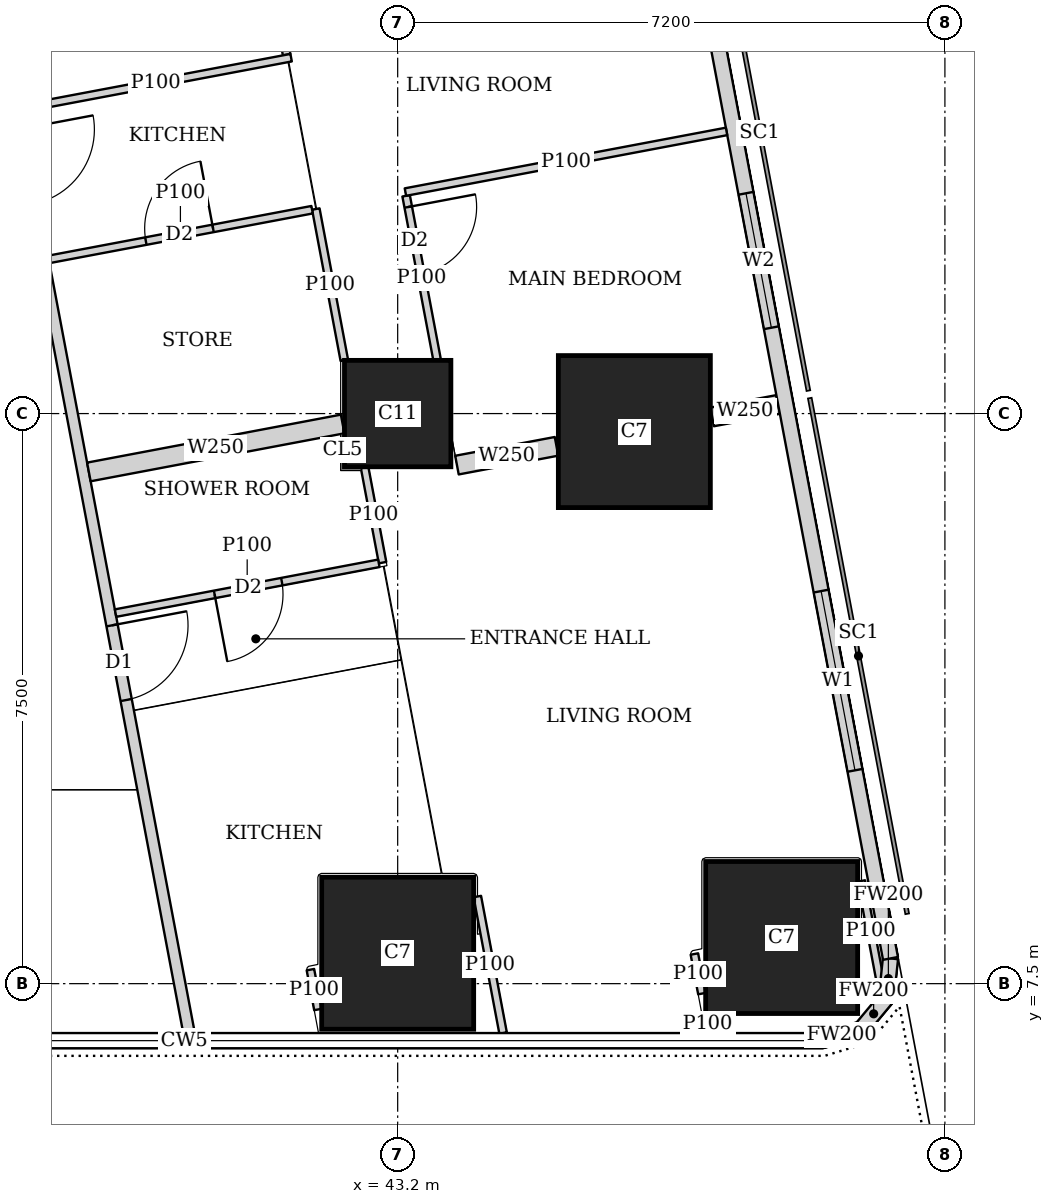
"""IFC4 building model, lengths in metres.
Left out: names, types, materials, properties, quantities, classifications, styles, units other than length and angle.
Written with IfcOpenShell. Run it as: python <this file> out.ifc"""

import sys

from ifc_helpers import new_model, si_unit, direction, frame, frame_2d, origin, origin_2d, place, context, subcontext, project, spatial, rectangle, extrude, element, fill, save


model = new_model("IFC4")
c1 = context("Model", 3, precision=1e-05, world=origin(), true_north=direction((0.0, 1.0)))
c2 = subcontext(c1, "Body", "Model", "MODEL_VIEW")
j1 = project(units=[si_unit("LENGTHUNIT", "METRE"), si_unit("PLANEANGLEUNIT", "RADIAN")], contexts=[c1])
p1 = place(None, origin())
s1 = spatial("IfcSite", under=j1, at=p1, CompositionType="ELEMENT")
p2 = place(p1, origin())
s2 = spatial("IfcBuilding", under=s1, at=p2, CompositionType="ELEMENT")
p3 = place(p2, frame((0.0, 0.0, 251.6)))
s3 = spatial("IfcBuildingStorey", under=s2, at=p3, CompositionType="ELEMENT", Elevation=251.6)
for number, where, z_axis, x_axis in (
    (1, (43.2, 7.9, 0.0), (0.0, 0.0, 1.0), (1.0, 0.0, 0.0)),
    (2, (48.252, 8.107, 0.0), (0.0, 0.0, 1.0), (1.0, 0.0, 0.0)),
):
    element("IfcColumn", number, at=place(p3, frame(where, z_axis=z_axis, x_axis=x_axis)), inside=s3, PredefinedType="COLUMN", context=c2, shape_type="SweptSolid", body=[
        extrude(rectangle(XDim=2.0, YDim=2.0, at=origin_2d()), origin(), (0.0, 0.0, 1.0), 3.75),
    ])
p4 = place(p3, frame((43.2, 15.0, 0.0), z_axis=(0.0, 0.0, 1.0), x_axis=(1.0, 0.0, 0.0)))
e3 = element("IfcColumn", 3, at=p4, inside=s3, PredefinedType="COLUMN", context=c2, shape_type="SweptSolid", body=[
    extrude(rectangle(XDim=1.4, YDim=1.4, at=origin_2d()), origin(), (0.0, 0.0, 1.0), 3.75),
])
p5 = place(p3, frame((46.314, 14.763, 0.0), z_axis=(0.0, 0.0, 1.0), x_axis=(1.0, 0.0, 0.0)))
e4 = element("IfcColumn", 4, at=p5, inside=s3, PredefinedType="COLUMN", context=c2, shape_type="SweptSolid", body=[
    extrude(rectangle(XDim=2.0, YDim=2.0, at=origin_2d()), origin(), (0.0, 0.0, 1.0), 3.75),
])
p6 = place(p3, frame((48.787, 6.75, 0.0), z_axis=(0.0, 0.0, 1.0), x_axis=(0.957282247819, 0.289155145225, 0.0)))
e5 = element("IfcWall", 5, at=p6, inside=s3, PredefinedType="SOLIDWALL", context=c2, shape_type="SweptSolid", body=[
    extrude(rectangle(XDim=0.533, YDim=0.2, at=frame_2d((0.266, 0.0))), origin(), (0.0, 0.0, 1.0), 3.5),
])
p7 = place(p3, frame((49.297, 6.904, 0.0), z_axis=(0.0, 0.0, 1.0), x_axis=(0.639255849474, 0.768994121508, 0.0)))
e6 = element("IfcWall", 6, at=p7, inside=s3, PredefinedType="SOLIDWALL", context=c2, shape_type="SweptSolid", body=[
    extrude(rectangle(XDim=0.518, YDim=0.2, at=frame_2d((0.259, 0.0))), origin(), (0.0, 0.0, 1.0), 3.5),
])
p8 = place(p3, frame((49.628, 7.302, 0.0), z_axis=(0.0, 0.0, 1.0), x_axis=(0.105352390132, 0.994434952068, 0.0)))
e7 = element("IfcWall", 7, at=p8, inside=s3, PredefinedType="SOLIDWALL", context=c2, shape_type="SweptSolid", body=[
    extrude(rectangle(XDim=0.533, YDim=0.2, at=frame_2d((0.267, 0.0))), origin(), (0.0, 0.0, 1.0), 3.5),
])
p9 = place(p3, frame((49.684, 7.832, 0.0), z_axis=(0.0, 0.0, 1.0), x_axis=(-0.185616669694, 0.982622232565, 0.0)))
e8 = element("IfcWall", 8, at=p9, inside=s3, PredefinedType="SOLIDWALL", context=c2, shape_type="SweptSolid", body=[
    extrude(rectangle(XDim=36.0, YDim=0.2, at=frame_2d((18.0, 0.0))), origin(), (0.0, 0.0, 1.0), 3.5),
])
p10 = place(p9, frame((2.518, 0.0, 0.9)))
e9 = element("IfcOpeningElement", 9, at=p10, cuts=e8, PredefinedType="OPENING", context=c2, shape_type="SweptSolid", body=[
    extrude(rectangle(XDim=2.4, YDim=1.5, at=frame_2d((1.2, 0.75))), frame((0.0, 0.11, 0.0), z_axis=(0.0, -1.0, 0.0), x_axis=(1.0, 0.0, 0.0)), (0.0, 0.0, 1.0), 0.22),
])
p11 = place(p9, frame((8.444, 0.0, 0.9)))
e10 = element("IfcOpeningElement", 10, at=p11, cuts=e8, PredefinedType="OPENING", context=c2, shape_type="SweptSolid", body=[
    extrude(rectangle(XDim=1.8, YDim=1.5, at=frame_2d((0.9, 0.75))), frame((0.0, 0.11, 0.0), z_axis=(0.0, -1.0, 0.0), x_axis=(1.0, 0.0, 0.0)), (0.0, 0.0, 1.0), 0.22),
])
p12 = place(p9, frame((12.261, 0.0, 0.9)))
e11 = element("IfcOpeningElement", 11, at=p12, cuts=e8, PredefinedType="OPENING", context=c2, shape_type="SweptSolid", body=[
    extrude(rectangle(XDim=1.8, YDim=1.5, at=frame_2d((0.9, 0.75))), frame((0.0, 0.11, 0.0), z_axis=(0.0, -1.0, 0.0), x_axis=(1.0, 0.0, 0.0)), (0.0, 0.0, 1.0), 0.22),
])
p13 = place(p9, frame((16.078, 0.0, 0.9)))
e12 = element("IfcOpeningElement", 12, at=p13, cuts=e8, PredefinedType="OPENING", context=c2, shape_type="SweptSolid", body=[
    extrude(rectangle(XDim=1.8, YDim=1.5, at=frame_2d((0.9, 0.75))), frame((0.0, 0.11, 0.0), z_axis=(0.0, -1.0, 0.0), x_axis=(1.0, 0.0, 0.0)), (0.0, 0.0, 1.0), 0.22),
])
p14 = place(p9, frame((19.894, 0.0, 0.9)))
e13 = element("IfcOpeningElement", 13, at=p14, cuts=e8, PredefinedType="OPENING", context=c2, shape_type="SweptSolid", body=[
    extrude(rectangle(XDim=1.8, YDim=1.5, at=frame_2d((0.9, 0.75))), frame((0.0, 0.11, 0.0), z_axis=(0.0, -1.0, 0.0), x_axis=(1.0, 0.0, 0.0)), (0.0, 0.0, 1.0), 0.22),
])
p15 = place(p9, frame((23.71, 0.0, 0.9)))
e14 = element("IfcOpeningElement", 14, at=p15, cuts=e8, PredefinedType="OPENING", context=c2, shape_type="SweptSolid", body=[
    extrude(rectangle(XDim=1.8, YDim=1.5, at=frame_2d((0.9, 0.75))), frame((0.0, 0.11, 0.0), z_axis=(0.0, -1.0, 0.0), x_axis=(1.0, 0.0, 0.0)), (0.0, 0.0, 1.0), 0.22),
])
p16 = place(p9, frame((27.526, 0.0, 0.9)))
e15 = element("IfcOpeningElement", 15, at=p16, cuts=e8, PredefinedType="OPENING", context=c2, shape_type="SweptSolid", body=[
    extrude(rectangle(XDim=1.8, YDim=1.5, at=frame_2d((0.9, 0.75))), frame((0.0, 0.11, 0.0), z_axis=(0.0, -1.0, 0.0), x_axis=(1.0, 0.0, 0.0)), (0.0, 0.0, 1.0), 0.22),
])
p17 = place(p9, frame((32.046, 0.0, 0.9)))
e16 = element("IfcOpeningElement", 16, at=p17, cuts=e8, PredefinedType="OPENING", context=c2, shape_type="SweptSolid", body=[
    extrude(rectangle(XDim=1.8, YDim=1.5, at=frame_2d((0.9, 0.75))), frame((0.0, 0.11, 0.0), z_axis=(0.0, -1.0, 0.0), x_axis=(1.0, 0.0, 0.0)), (0.0, 0.0, 1.0), 0.22),
])
p18 = place(p3, frame((33.781, 42.186, 0.0), z_axis=(0.0, 0.0, 1.0), x_axis=(0.185593518645, -0.9826266055, 0.0)))
e17 = element("IfcWall", 17, at=p18, inside=s3, PredefinedType="SOLIDWALL", context=c2, shape_type="SweptSolid", body=[
    extrude(rectangle(XDim=35.961, YDim=0.15, at=frame_2d((17.98, 0.0))), origin(), (0.0, 0.0, 1.0), 2.5),
])
p19 = place(p18, frame((7.183, 0.0, 0.0)))
e18 = element("IfcOpeningElement", 18, at=p19, cuts=e17, PredefinedType="OPENING", context=c2, shape_type="SweptSolid", body=[
    extrude(rectangle(XDim=1.0, YDim=2.1, at=frame_2d((0.5, 1.05))), frame((0.0, 0.085, 0.0), z_axis=(0.0, -1.0, 0.0), x_axis=(1.0, 0.0, 0.0)), (0.0, 0.0, 1.0), 0.17),
])
p20 = place(p18, frame((11.76, 0.0, 0.0)))
e19 = element("IfcOpeningElement", 19, at=p20, cuts=e17, PredefinedType="OPENING", context=c2, shape_type="SweptSolid", body=[
    extrude(rectangle(XDim=1.0, YDim=2.1, at=frame_2d((0.5, 1.05))), frame((0.0, 0.085, 0.0), z_axis=(0.0, -1.0, 0.0), x_axis=(1.0, 0.0, 0.0)), (0.0, 0.0, 1.0), 0.17),
])
p21 = place(p18, frame((23.863, 0.0, 0.0)))
e20 = element("IfcOpeningElement", 20, at=p21, cuts=e17, PredefinedType="OPENING", context=c2, shape_type="SweptSolid", body=[
    extrude(rectangle(XDim=1.0, YDim=2.1, at=frame_2d((0.5, 1.05))), frame((0.0, 0.085, 0.0), z_axis=(0.0, -1.0, 0.0), x_axis=(1.0, 0.0, 0.0)), (0.0, 0.0, 1.0), 0.17),
])
p22 = place(p18, frame((30.502, 0.0, 0.0)))
e21 = element("IfcOpeningElement", 21, at=p22, cuts=e17, PredefinedType="OPENING", context=c2, shape_type="SweptSolid", body=[
    extrude(rectangle(XDim=1.0, YDim=2.1, at=frame_2d((0.5, 1.05))), frame((0.0, 0.085, 0.0), z_axis=(0.0, -1.0, 0.0), x_axis=(1.0, 0.0, 0.0)), (0.0, 0.0, 1.0), 0.17),
])
p23 = place(p3, frame((44.248, 8.646, 0.0), z_axis=(0.0, 0.0, 1.0), x_axis=(0.185417594585, -0.982659816833, 0.0)))
e22 = element("IfcWall", 22, at=p23, inside=s3, PredefinedType="PARTITIONING", context=c2, shape_type="SweptSolid", body=[
    extrude(rectangle(XDim=1.828, YDim=0.1, at=frame_2d((0.914, 0.0))), origin(), (0.0, 0.0, 1.0), 2.05),
])
p24 = place(p3, frame((42.151, 7.16, 0.0), z_axis=(0.0, 0.0, 1.0), x_axis=(-0.185366164644, 0.982669519729, 0.0)))
e23 = element("IfcWall", 23, at=p24, inside=s3, PredefinedType="PARTITIONING", context=c2, shape_type="SweptSolid", body=[
    extrude(rectangle(XDim=0.533, YDim=0.1, at=frame_2d((0.267, 0.0))), origin(), (0.0, 0.0, 1.0), 2.5),
])
p25 = place(p3, frame((49.3, 8.851, 0.0), z_axis=(0.0, 0.0, 1.0), x_axis=(0.18581620423, -0.982584519645, 0.0)))
e24 = element("IfcWall", 24, at=p25, inside=s3, PredefinedType="PARTITIONING", context=c2, shape_type="SweptSolid", body=[
    extrude(rectangle(XDim=1.351, YDim=0.1, at=frame_2d((0.675, 0.0))), origin(), (0.0, 0.0, 1.0), 3.5),
])
p26 = place(p3, frame((47.301, 6.85, 0.0), z_axis=(0.0, 0.0, 1.0), x_axis=(-0.187513903188, 0.982261948826, 0.0)))
e25 = element("IfcWall", 25, at=p26, inside=s3, PredefinedType="PARTITIONING", context=c2, shape_type="SweptSolid", body=[
    extrude(rectangle(XDim=0.251, YDim=0.1, at=frame_2d((0.125, 0.0))), origin(), (0.0, 0.0, 1.0), 3.5),
])
p27 = place(p3, frame((47.203, 7.369, 0.0), z_axis=(0.0, 0.0, 1.0), x_axis=(-0.186456243114, 0.982463266185, 0.0)))
e26 = element("IfcWall", 26, at=p27, inside=s3, PredefinedType="PARTITIONING", context=c2, shape_type="SweptSolid", body=[
    extrude(rectangle(XDim=0.53, YDim=0.1, at=frame_2d((0.265, 0.0))), origin(), (0.0, 0.0, 1.0), 2.05),
])
p28 = place(p3, frame((41.437, 21.319, 0.0), z_axis=(0.0, 0.0, 1.0), x_axis=(0.185793689589, -0.982588777113, 0.0)))
e27 = element("IfcWall", 27, at=p28, inside=s3, PredefinedType="PARTITIONING", context=c2, shape_type="SweptSolid", body=[
    extrude(rectangle(XDim=1.625, YDim=0.1, at=frame_2d((0.813, 0.0))), origin(), (0.0, 0.0, 1.0), 3.5),
])
p29 = place(p28, frame((0.325, 0.0, 0.0)))
e28 = element("IfcOpeningElement", 28, at=p29, cuts=e27, PredefinedType="OPENING", context=c2, shape_type="SweptSolid", body=[
    extrude(rectangle(XDim=0.9, YDim=2.1, at=frame_2d((0.45, 1.05))), frame((0.0, 0.06, 0.0), z_axis=(0.0, -1.0, 0.0), x_axis=(1.0, 0.0, 0.0)), (0.0, 0.0, 1.0), 0.12),
])
p30 = place(p3, frame((41.798, 19.682, 0.0), z_axis=(0.0, 0.0, 1.0), x_axis=(-0.982681091817, -0.185304807776, 0.0)))
e29 = element("IfcWall", 29, at=p30, inside=s3, PredefinedType="PARTITIONING", context=c2, shape_type="SweptSolid", body=[
    extrude(rectangle(XDim=3.626, YDim=0.1, at=frame_2d((1.813, 0.0))), origin(), (0.0, 0.0, 1.0), 3.5),
])
p31 = place(p3, frame((43.311, 17.865, 0.0), z_axis=(0.0, 0.0, 1.0), x_axis=(0.185572140257, -0.982630643101, 0.0)))
e30 = element("IfcWall", 30, at=p31, inside=s3, PredefinedType="PARTITIONING", context=c2, shape_type="SweptSolid", body=[
    extrude(rectangle(XDim=2.193, YDim=0.1, at=frame_2d((1.097, 0.0))), origin(), (0.0, 0.0, 1.0), 3.5),
])
p32 = place(p31, frame((0.15, 0.0, 0.0)))
e31 = element("IfcOpeningElement", 31, at=p32, cuts=e30, PredefinedType="OPENING", context=c2, shape_type="SweptSolid", body=[
    extrude(rectangle(XDim=0.9, YDim=2.1, at=frame_2d((0.45, 1.05))), frame((0.0, 0.06, 0.0), z_axis=(0.0, -1.0, 0.0), x_axis=(1.0, 0.0, 0.0)), (0.0, 0.0, 1.0), 0.12),
])
p33 = place(p3, frame((42.123, 17.691, 0.0), z_axis=(0.0, 0.0, 1.0), x_axis=(0.185183804812, -0.98270390171, 0.0)))
e32 = element("IfcWall", 32, at=p33, inside=s3, PredefinedType="PARTITIONING", context=c2, shape_type="SweptSolid", body=[
    extrude(rectangle(XDim=2.025, YDim=0.1, at=frame_2d((1.012, 0.0))), origin(), (0.0, 0.0, 1.0), 3.5),
])
p34 = place(p3, frame((47.527, 18.712, 0.0), z_axis=(0.0, 0.0, 1.0), x_axis=(-0.982633535512, -0.185556823879, 0.0)))
e33 = element("IfcWall", 33, at=p34, inside=s3, PredefinedType="PARTITIONING", context=c2, shape_type="SweptSolid", body=[
    extrude(rectangle(XDim=4.3, YDim=0.1, at=frame_2d((2.15, 0.0))), origin(), (0.0, 0.0, 1.0), 2.5),
])
p35 = place(p3, frame((42.074, 17.682, 0.0), z_axis=(0.0, 0.0, 1.0), x_axis=(-0.982660701716, -0.185412904897, 0.0)))
e34 = element("IfcWall", 34, at=p35, inside=s3, PredefinedType="PARTITIONING", context=c2, shape_type="SweptSolid", body=[
    extrude(rectangle(XDim=3.526, YDim=0.1, at=frame_2d((1.763, 0.0))), origin(), (0.0, 0.0, 1.0), 3.5),
])
p36 = place(p35, frame((1.326, 0.0, 0.0)))
e35 = element("IfcOpeningElement", 35, at=p36, cuts=e34, PredefinedType="OPENING", context=c2, shape_type="SweptSolid", body=[
    extrude(rectangle(XDim=0.9, YDim=2.1, at=frame_2d((0.45, 1.05))), frame((0.0, 0.06, 0.0), z_axis=(0.0, -1.0, 0.0), x_axis=(1.0, 0.0, 0.0)), (0.0, 0.0, 1.0), 0.12),
])
p37 = place(p3, frame((42.765, 14.29, 0.0), z_axis=(0.0, 0.0, 1.0), x_axis=(0.185446293138, -0.982654401283, 0.0)))
e36 = element("IfcWall", 36, at=p37, inside=s3, PredefinedType="PARTITIONING", context=c2, shape_type="SweptSolid", body=[
    extrude(rectangle(XDim=1.273, YDim=0.1, at=frame_2d((0.636, 0.0))), origin(), (0.0, 0.0, 1.0), 3.5),
])
p38 = place(p3, frame((42.952, 13.03, 0.0), z_axis=(0.0, 0.0, 1.0), x_axis=(-0.982585626838, -0.185810349366, 0.0)))
e37 = element("IfcWall", 37, at=p38, inside=s3, PredefinedType="PARTITIONING", context=c2, shape_type="SweptSolid", body=[
    extrude(rectangle(XDim=3.525, YDim=0.1, at=frame_2d((1.763, 0.0))), origin(), (0.0, 0.0, 1.0), 3.5),
])
p39 = place(p38, frame((1.299, 0.0, 0.0)))
e38 = element("IfcOpeningElement", 38, at=p39, cuts=e37, PredefinedType="OPENING", context=c2, shape_type="SweptSolid", body=[
    extrude(rectangle(XDim=0.9, YDim=2.1, at=frame_2d((0.45, 1.05))), frame((0.0, 0.06, 0.0), z_axis=(0.0, -1.0, 0.0), x_axis=(1.0, 0.0, 0.0)), (0.0, 0.0, 1.0), 0.12),
])
p40 = place(p3, frame((48.206, 15.12, 0.0), z_axis=(0.0, 0.0, 1.0), x_axis=(-0.982608419258, -0.185689780017, 0.0)))
e39 = element("IfcWall", 39, at=p40, inside=s3, PredefinedType="SOLIDWALL", context=c2, shape_type="SweptSolid", body=[
    extrude(rectangle(XDim=0.884, YDim=0.25, at=frame_2d((0.442, 0.0))), origin(), (0.0, 0.0, 1.0), 3.5),
])
p41 = place(p3, frame((45.29, 14.569, 0.0), z_axis=(0.0, 0.0, 1.0), x_axis=(-0.982676759201, -0.185327782391, 0.0)))
e40 = element("IfcWall", 40, at=p41, inside=s3, PredefinedType="SOLIDWALL", context=c2, shape_type="SweptSolid", body=[
    extrude(rectangle(XDim=1.333, YDim=0.25, at=frame_2d((0.667, 0.0))), origin(), (0.0, 0.0, 1.0), 3.5),
])
p42 = place(p3, frame((42.476, 14.863, 0.0), z_axis=(0.0, 0.0, 1.0), x_axis=(-0.982603567712, -0.185715450942, 0.0)))
e41 = element("IfcWall", 41, at=p42, inside=s3, PredefinedType="SOLIDWALL", context=c2, shape_type="SweptSolid", body=[
    extrude(rectangle(XDim=3.398, YDim=0.25, at=frame_2d((1.699, 0.0))), origin(), (0.0, 0.0, 1.0), 3.5),
])
p43 = place(p10, origin())
e42 = element("IfcWindow", 42, at=p43, inside=s3, PartitioningType="SINGLE_PANEL", PredefinedType="WINDOW", context=c2, shape_type="SweptSolid", body=[
    extrude(rectangle(XDim=2.4, YDim=1.5, at=frame_2d((1.2, 0.75))), frame((0.0, 0.03, 0.0), z_axis=(0.0, -1.0, 0.0), x_axis=(1.0, 0.0, 0.0)), (0.0, 0.0, 1.0), 0.06),
])
fill(e9, e42)
p44 = place(p11, origin())
e43 = element("IfcWindow", 43, at=p44, inside=s3, PartitioningType="SINGLE_PANEL", PredefinedType="WINDOW", context=c2, shape_type="SweptSolid", body=[
    extrude(rectangle(XDim=1.8, YDim=1.5, at=frame_2d((0.9, 0.75))), frame((0.0, 0.03, 0.0), z_axis=(0.0, -1.0, 0.0), x_axis=(1.0, 0.0, 0.0)), (0.0, 0.0, 1.0), 0.06),
])
fill(e10, e43)
p45 = place(p32, origin())
e44 = element("IfcDoor", 44, at=p45, inside=s3, OperationType="SINGLE_SWING_LEFT", PredefinedType="DOOR", context=c2, shape_type="SweptSolid", body=[
    extrude(rectangle(XDim=0.9, YDim=2.1, at=frame_2d((0.45, 1.05))), frame((0.0, 0.025, 0.0), z_axis=(0.0, -1.0, 0.0), x_axis=(1.0, 0.0, 0.0)), (0.0, 0.0, 1.0), 0.05),
])
fill(e31, e44)
p46 = place(p39, origin())
e45 = element("IfcDoor", 45, at=p46, inside=s3, OperationType="SINGLE_SWING_RIGHT", PredefinedType="DOOR", context=c2, shape_type="SweptSolid", body=[
    extrude(rectangle(XDim=0.9, YDim=2.1, at=frame_2d((0.45, 1.05))), frame((0.0, 0.025, 0.0), z_axis=(0.0, -1.0, 0.0), x_axis=(1.0, 0.0, 0.0)), (0.0, 0.0, 1.0), 0.05),
])
fill(e38, e45)
p47 = place(p22, origin())
e46 = element("IfcDoor", 46, at=p47, inside=s3, OperationType="SINGLE_SWING_LEFT", PredefinedType="DOOR", context=c2, shape_type="SweptSolid", body=[
    extrude(rectangle(XDim=1.0, YDim=2.1, at=frame_2d((0.5, 1.05))), frame((0.0, 0.025, 0.0), z_axis=(0.0, -1.0, 0.0), x_axis=(1.0, 0.0, 0.0)), (0.0, 0.0, 1.0), 0.05),
])
fill(e21, e46)
p48 = place(p36, origin())
e47 = element("IfcDoor", 47, at=p48, inside=s3, OperationType="SINGLE_SWING_RIGHT", PredefinedType="DOOR", context=c2, shape_type="SweptSolid", body=[
    extrude(rectangle(XDim=0.9, YDim=2.1, at=frame_2d((0.45, 1.05))), frame((0.0, 0.025, 0.0), z_axis=(0.0, -1.0, 0.0), x_axis=(1.0, 0.0, 0.0)), (0.0, 0.0, 1.0), 0.05),
])
fill(e35, e47)
save(model, sys.argv[1])
